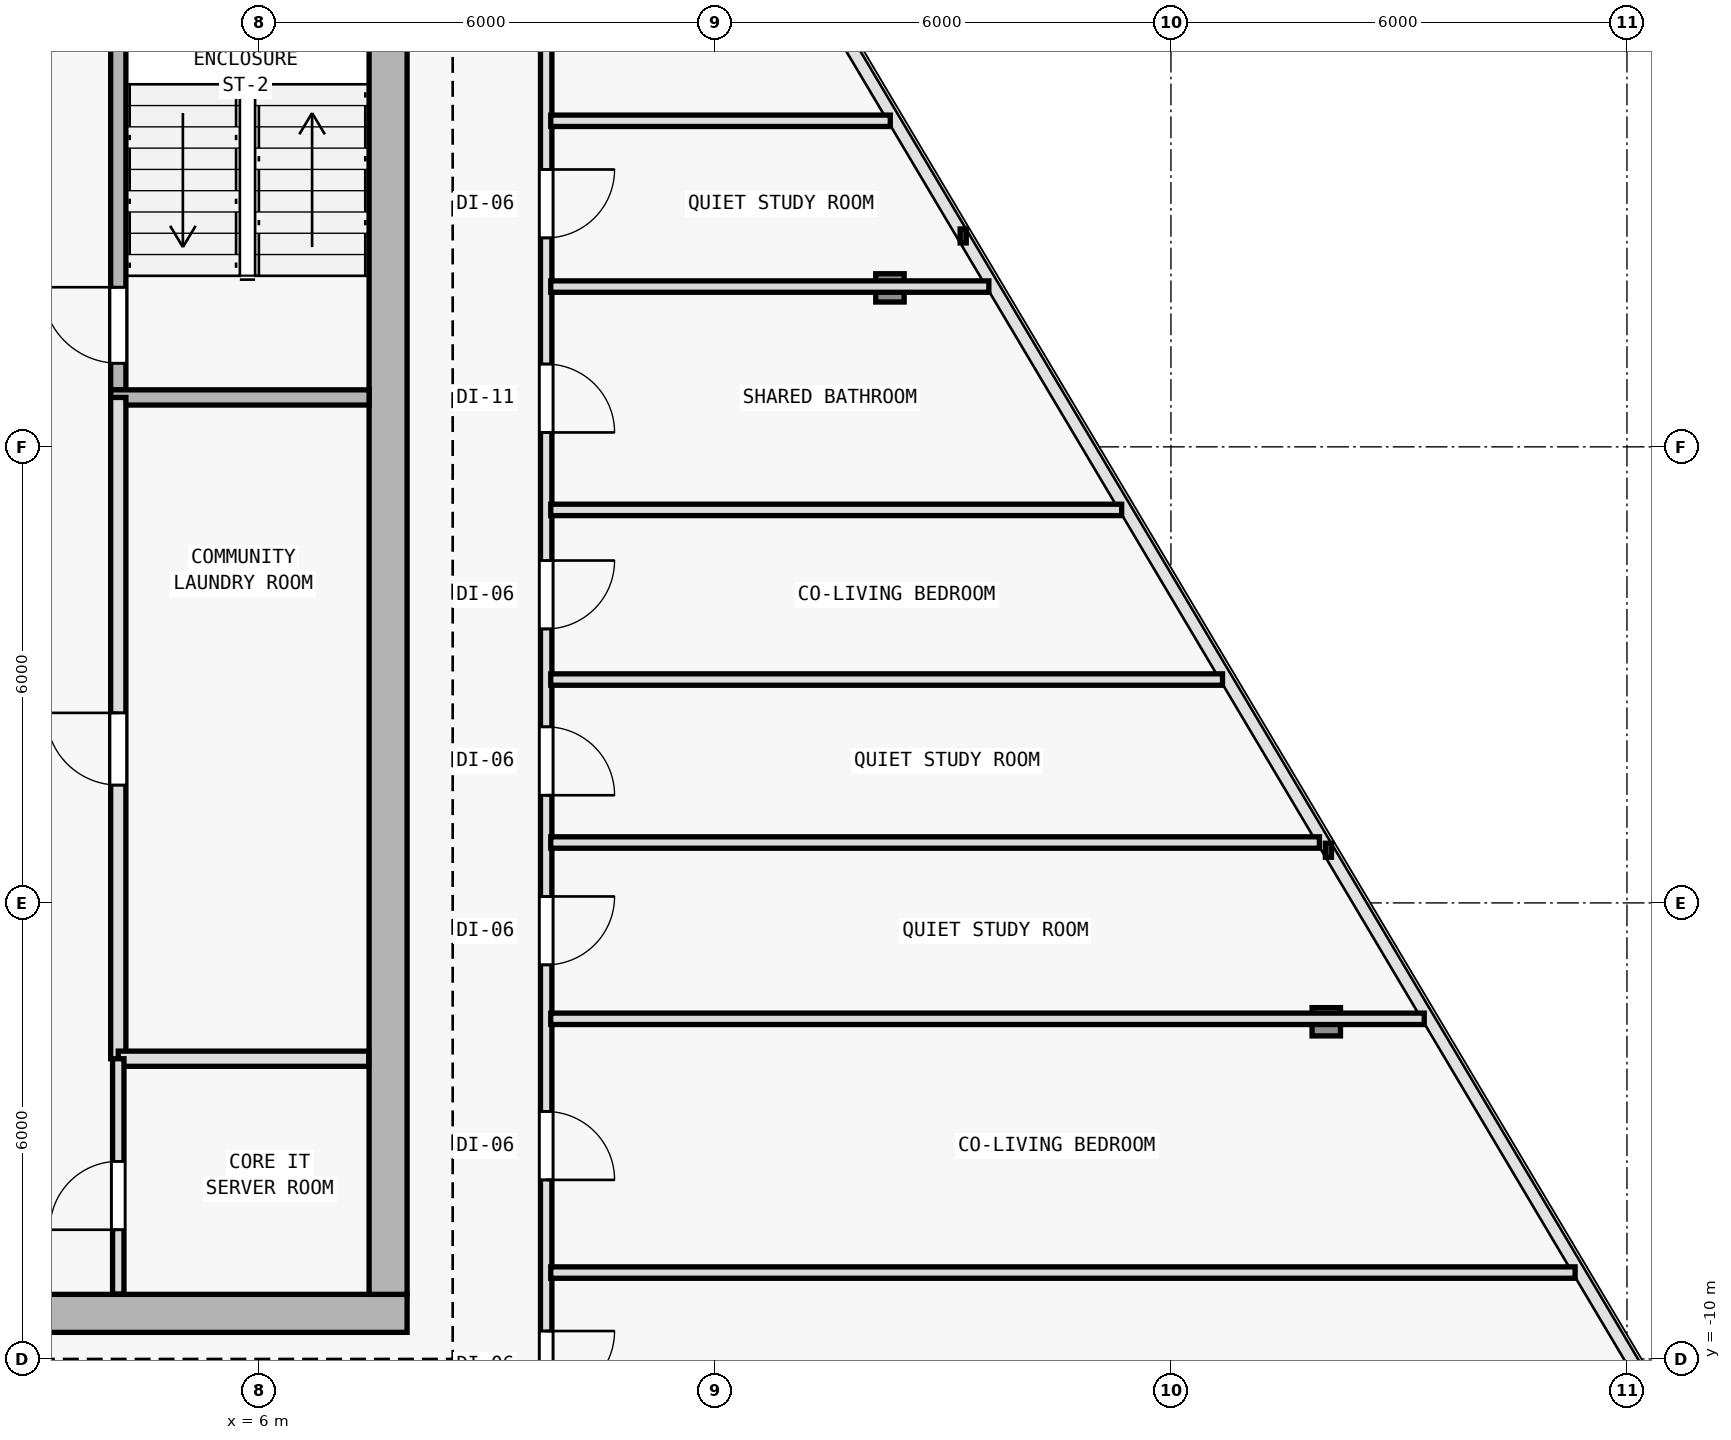
"""IFC4 building model, lengths in metres.
Left out: names, types, materials, properties, quantities, classifications, styles, units other than length and angle.
Written with IfcOpenShell. Run it as: python <this file> out.ifc"""

import sys

from ifc_helpers import new_model, si_unit, direction, frame, frame_2d, origin, origin_2d, place, context, subcontext, project, spatial, rectangle, i_section, extrude, element, fill, save


model = new_model("IFC4")
c1 = context("Model", 3, precision=1e-05, world=origin(), true_north=direction((0.0, 1.0)))
c2 = subcontext(c1, "Body", "Model", "MODEL_VIEW")
j1 = project(units=[si_unit("LENGTHUNIT", "METRE"), si_unit("PLANEANGLEUNIT", "RADIAN")], contexts=[c1])
p1 = place(None, origin())
s1 = spatial("IfcSite", under=j1, at=p1, CompositionType="ELEMENT")
p2 = place(p1, origin())
s2 = spatial("IfcBuilding", under=s1, at=p2, CompositionType="ELEMENT")
p3 = place(p2, frame((0.0, 0.0, 230.7)))
s3 = spatial("IfcBuildingStorey", under=s2, at=p3, CompositionType="ELEMENT", Elevation=230.7)
for number, where, z_axis, x_axis in (
    (1, (7.7, -9.4, 0.0), (0.0, 0.0, 1.0), (1.0, 0.0, 0.0)),
    (2, (7.7, 0.4, 0.0), (0.0, 0.0, 1.0), (1.0, 0.0, 0.0)),
):
    element("IfcColumn", number, at=place(p3, frame(where, z_axis=z_axis, x_axis=x_axis)), inside=s3, PredefinedType="COLUMN", context=c2, shape_type="SweptSolid", body=[
        extrude(i_section(OverallWidth=0.398, OverallDepth=0.387, WebThickness=0.013, FlangeThickness=0.022, FilletRadius=0.015, at=origin_2d()), origin(), (0.0, 0.0, 1.0), 3.6),
    ])
p4 = place(p3, frame((20.044, -5.564, 0.006), z_axis=(-0.026107436898, 0.021620221181, 0.999425318758), x_axis=(-0.637813971185, -0.770190455771, 0.0)))
e3 = element("IfcColumn", 3, at=p4, inside=s3, PredefinedType="COLUMN", context=c2, shape_type="SweptSolid", body=[
    extrude(i_section(OverallWidth=0.374, OverallDepth=0.372, WebThickness=0.012, FlangeThickness=0.02, FilletRadius=0.015, at=origin_2d()), origin(), (0.0, 0.0, 1.0), 3.591),
])
p5 = place(p3, frame((14.303, 4.092, 0.006), z_axis=(-0.018907326549, 0.00952167524, 0.999775900241), x_axis=(-0.449781931574, -0.893138406984, 0.0)))
e4 = element("IfcColumn", 4, at=p5, inside=s3, PredefinedType="COLUMN", context=c2, shape_type="SweptSolid", body=[
    extrude(i_section(OverallWidth=0.374, OverallDepth=0.372, WebThickness=0.012, FlangeThickness=0.02, FilletRadius=0.015, at=origin_2d()), origin(), (0.0, 0.0, 1.0), 3.59),
])
p6 = place(p3, frame((-7.95, -9.4, 0.0), z_axis=(0.0, 0.0, 1.0), x_axis=(1.0, 0.0, 0.0)))
e5 = element("IfcWall", 5, at=p6, inside=s3, PredefinedType="SHEAR", context=c2, shape_type="SweptSolid", body=[
    extrude(rectangle(XDim=15.9, YDim=0.5, at=frame_2d((7.95, 0.0))), origin(), (0.0, 0.0, 1.0), 3.35),
])
p7 = place(p6, frame((9.6, 0.0, 0.0)))
e6 = element("IfcOpeningElement", 6, at=p7, cuts=e5, PredefinedType="OPENING", context=c2, shape_type="SweptSolid", body=[
    extrude(rectangle(XDim=1.5, YDim=2.2, at=frame_2d((0.75, 1.1))), frame((0.0, 0.26, 0.0), z_axis=(0.0, -1.0, 0.0), x_axis=(1.0, 0.0, 0.0)), (0.0, 0.0, 1.0), 0.52),
])
p8 = place(p3, frame((7.7, 9.95, 0.0), z_axis=(0.0, 0.0, 1.0), x_axis=(0.0, -1.0, 0.0)))
e7 = element("IfcWall", 7, at=p8, inside=s3, PredefinedType="SHEAR", context=c2, shape_type="SweptSolid", body=[
    extrude(rectangle(XDim=19.1, YDim=0.5, at=frame_2d((9.55, 0.0))), origin(), (0.0, 0.0, 1.0), 3.35),
])
p9 = place(p3, frame((4.15, 2.75, 0.0), z_axis=(0.0, 0.0, 1.0), x_axis=(0.0, 1.0, 0.0)))
e8 = element("IfcWall", 8, at=p9, inside=s3, PredefinedType="SOLIDWALL", context=c2, shape_type="SweptSolid", body=[
    extrude(rectangle(XDim=7.2, YDim=0.2, at=frame_2d((3.6, 0.0))), origin(), (0.0, 0.0, 1.0), 3.35),
])
p10 = place(p9, frame((0.35, 0.0, 0.0)))
e9 = element("IfcOpeningElement", 9, at=p10, cuts=e8, PredefinedType="OPENING", context=c2, shape_type="SweptSolid", body=[
    extrude(rectangle(XDim=1.0, YDim=2.15, at=frame_2d((0.5, 1.075))), frame((0.0, 0.11, 0.0), z_axis=(0.0, -1.0, 0.0), x_axis=(1.0, 0.0, 0.0)), (0.0, 0.0, 1.0), 0.22),
])
p11 = place(p3, frame((4.05, 2.65, 0.0), z_axis=(0.0, 0.0, 1.0), x_axis=(1.0, 0.0, 0.0)))
e10 = element("IfcWall", 10, at=p11, inside=s3, PredefinedType="SOLIDWALL", context=c2, shape_type="SweptSolid", body=[
    extrude(rectangle(XDim=3.4, YDim=0.2, at=frame_2d((1.7, 0.0))), origin(), (0.0, 0.0, 1.0), 3.35),
])
p12 = place(p3, frame((4.15, -6.05, 0.0), z_axis=(0.0, 0.0, 1.0), x_axis=(0.0, 1.0, 0.0)))
e11 = element("IfcWall", 11, at=p12, inside=s3, PredefinedType="SOLIDWALL", context=c2, shape_type="SweptSolid", body=[
    extrude(rectangle(XDim=8.7, YDim=0.2, at=frame_2d((4.35, 0.0))), origin(), (0.0, 0.0, 1.0), 3.35),
])
p13 = place(p12, frame((3.6, 0.0, 0.0)))
e12 = element("IfcOpeningElement", 12, at=p13, cuts=e11, PredefinedType="OPENING", context=c2, shape_type="SweptSolid", body=[
    extrude(rectangle(XDim=0.95, YDim=2.1, at=frame_2d((0.475, 1.05))), frame((0.0, 0.11, 0.0), z_axis=(0.0, -1.0, 0.0), x_axis=(1.0, 0.0, 0.0)), (0.0, 0.0, 1.0), 0.22),
])
p14 = place(p3, frame((4.15, -6.05, 0.0), z_axis=(0.0, 0.0, 1.0), x_axis=(1.0, 0.0, 0.0)))
e13 = element("IfcWall", 13, at=p14, inside=s3, PredefinedType="SOLIDWALL", context=c2, shape_type="SweptSolid", body=[
    extrude(rectangle(XDim=3.295, YDim=0.2, at=frame_2d((1.647, 0.0))), origin(), (0.0, 0.0, 1.0), 3.35),
])
p15 = place(p3, frame((4.15, -9.145, 0.0), z_axis=(0.0, 0.0, 1.0), x_axis=(0.0, 1.0, 0.0)))
e14 = element("IfcWall", 14, at=p15, inside=s3, PredefinedType="PARTITIONING", context=c2, shape_type="SweptSolid", body=[
    extrude(rectangle(XDim=3.095, YDim=0.15, at=frame_2d((1.547, 0.0))), origin(), (0.0, 0.0, 1.0), 3.35),
])
p16 = place(p15, frame((0.845, 0.0, 0.0)))
e15 = element("IfcOpeningElement", 15, at=p16, cuts=e14, PredefinedType="OPENING", context=c2, shape_type="SweptSolid", body=[
    extrude(rectangle(XDim=0.9, YDim=2.1, at=frame_2d((0.45, 1.05))), frame((0.0, 0.085, 0.0), z_axis=(0.0, -1.0, 0.0), x_axis=(1.0, 0.0, 0.0)), (0.0, 0.0, 1.0), 0.17),
])
p17 = place(p3, frame((9.78, 8.226, 0.0), z_axis=(0.0, 0.0, 1.0), x_axis=(0.0, -1.0, 0.0)))
e16 = element("IfcWall", 16, at=p17, inside=s3, PredefinedType="PARTITIONING", context=c2, shape_type="SweptSolid", body=[
    extrude(rectangle(XDim=19.706, YDim=0.15, at=frame_2d((9.853, 0.0))), origin(), (0.0, 0.0, 1.0), 2.875),
])
p18 = place(p17, frame((17.858, 0.0, 0.0)))
e17 = element("IfcOpeningElement", 17, at=p18, cuts=e16, PredefinedType="OPENING", context=c2, shape_type="SweptSolid", body=[
    extrude(rectangle(XDim=0.9, YDim=2.1, at=frame_2d((0.45, 1.05))), frame((0.0, 0.085, 0.0), z_axis=(0.0, -1.0, 0.0), x_axis=(1.0, 0.0, 0.0)), (0.0, 0.0, 1.0), 0.17),
])
p19 = place(p17, frame((14.97, 0.0, 0.0)))
e18 = element("IfcOpeningElement", 18, at=p19, cuts=e16, PredefinedType="OPENING", context=c2, shape_type="SweptSolid", body=[
    extrude(rectangle(XDim=0.9, YDim=2.1, at=frame_2d((0.45, 1.05))), frame((0.0, 0.085, 0.0), z_axis=(0.0, -1.0, 0.0), x_axis=(1.0, 0.0, 0.0)), (0.0, 0.0, 1.0), 0.17),
])
p20 = place(p17, frame((12.141, 0.0, 0.0)))
e19 = element("IfcOpeningElement", 19, at=p20, cuts=e16, PredefinedType="OPENING", context=c2, shape_type="SweptSolid", body=[
    extrude(rectangle(XDim=0.9, YDim=2.1, at=frame_2d((0.45, 1.05))), frame((0.0, 0.085, 0.0), z_axis=(0.0, -1.0, 0.0), x_axis=(1.0, 0.0, 0.0)), (0.0, 0.0, 1.0), 0.17),
])
p21 = place(p17, frame((9.909, 0.0, 0.0)))
e20 = element("IfcOpeningElement", 20, at=p21, cuts=e16, PredefinedType="OPENING", context=c2, shape_type="SweptSolid", body=[
    extrude(rectangle(XDim=0.9, YDim=2.1, at=frame_2d((0.45, 1.05))), frame((0.0, 0.085, 0.0), z_axis=(0.0, -1.0, 0.0), x_axis=(1.0, 0.0, 0.0)), (0.0, 0.0, 1.0), 0.17),
])
p22 = place(p17, frame((7.721, 0.0, 0.0)))
e21 = element("IfcOpeningElement", 21, at=p22, cuts=e16, PredefinedType="OPENING", context=c2, shape_type="SweptSolid", body=[
    extrude(rectangle(XDim=0.9, YDim=2.1, at=frame_2d((0.45, 1.05))), frame((0.0, 0.085, 0.0), z_axis=(0.0, -1.0, 0.0), x_axis=(1.0, 0.0, 0.0)), (0.0, 0.0, 1.0), 0.17),
])
p23 = place(p17, frame((5.136, 0.0, 0.0)))
e22 = element("IfcOpeningElement", 22, at=p23, cuts=e16, PredefinedType="OPENING", context=c2, shape_type="SweptSolid", body=[
    extrude(rectangle(XDim=0.9, YDim=2.1, at=frame_2d((0.45, 1.05))), frame((0.0, 0.085, 0.0), z_axis=(0.0, -1.0, 0.0), x_axis=(1.0, 0.0, 0.0)), (0.0, 0.0, 1.0), 0.17),
])
p24 = place(p17, frame((2.577, 0.0, 0.0)))
e23 = element("IfcOpeningElement", 23, at=p24, cuts=e16, PredefinedType="OPENING", context=c2, shape_type="SweptSolid", body=[
    extrude(rectangle(XDim=0.9, YDim=2.1, at=frame_2d((0.45, 1.05))), frame((0.0, 0.085, 0.0), z_axis=(0.0, -1.0, 0.0), x_axis=(1.0, 0.0, 0.0)), (0.0, 0.0, 1.0), 0.17),
])
p25 = place(p3, frame((9.84, -5.525, 0.0), z_axis=(0.0, 0.0, 1.0), x_axis=(1.0, 0.0, 0.0)))
e24 = element("IfcWall", 24, at=p25, inside=s3, PredefinedType="PARTITIONING", context=c2, shape_type="SweptSolid", body=[
    extrude(rectangle(XDim=11.492, YDim=0.15, at=frame_2d((5.746, 0.0))), origin(), (0.0, 0.0, 1.0), 2.875),
])
p26 = place(p3, frame((9.84, 4.109, 0.0), z_axis=(0.0, 0.0, 1.0), x_axis=(1.0, 0.0, 0.0)))
e25 = element("IfcWall", 25, at=p26, inside=s3, PredefinedType="PARTITIONING", context=c2, shape_type="SweptSolid", body=[
    extrude(rectangle(XDim=5.764, YDim=0.15, at=frame_2d((2.882, 0.0))), origin(), (0.0, 0.0, 1.0), 2.965),
])
p27 = place(p3, frame((9.84, -1.061, 0.0), z_axis=(0.0, 0.0, 1.0), x_axis=(1.0, 0.0, 0.0)))
e26 = element("IfcWall", 26, at=p27, inside=s3, PredefinedType="PARTITIONING", context=c2, shape_type="SweptSolid", body=[
    extrude(rectangle(XDim=8.838, YDim=0.15, at=frame_2d((4.419, 0.0))), origin(), (0.0, 0.0, 1.0), 2.925),
])
p28 = place(p3, frame((9.84, -8.863, 0.0), z_axis=(0.0, 0.0, 1.0), x_axis=(1.0, 0.0, 0.0)))
e27 = element("IfcWall", 27, at=p28, inside=s3, PredefinedType="PARTITIONING", context=c2, shape_type="SweptSolid", body=[
    extrude(rectangle(XDim=13.478, YDim=0.15, at=frame_2d((6.739, 0.0))), origin(), (0.0, 0.0, 1.0), 2.875),
])
p29 = place(p3, frame((9.84, -3.205, 0.0), z_axis=(0.0, 0.0, 1.0), x_axis=(1.0, 0.0, 0.0)))
e28 = element("IfcWall", 28, at=p29, inside=s3, PredefinedType="PARTITIONING", context=c2, shape_type="SweptSolid", body=[
    extrude(rectangle(XDim=10.113, YDim=0.15, at=frame_2d((5.057, 0.0))), origin(), (0.0, 0.0, 1.0), 2.925),
])
p30 = place(p3, frame((9.84, 1.17, 0.0), z_axis=(0.0, 0.0, 1.0), x_axis=(1.0, 0.0, 0.0)))
e29 = element("IfcWall", 29, at=p30, inside=s3, PredefinedType="PARTITIONING", context=c2, shape_type="SweptSolid", body=[
    extrude(rectangle(XDim=7.511, YDim=0.15, at=frame_2d((3.756, 0.0))), origin(), (0.0, 0.0, 1.0), 2.925),
])
p31 = place(p3, frame((9.84, 6.29, 0.0), z_axis=(0.0, 0.0, 1.0), x_axis=(1.0, 0.0, 0.0)))
e30 = element("IfcWall", 30, at=p31, inside=s3, PredefinedType="PARTITIONING", context=c2, shape_type="SweptSolid", body=[
    extrude(rectangle(XDim=4.467, YDim=0.15, at=frame_2d((2.234, 0.0))), origin(), (0.0, 0.0, 1.0), 2.965),
])
p32 = place(p10, origin())
e31 = element("IfcDoor", 31, at=p32, inside=s3, OperationType="SINGLE_SWING_RIGHT", PredefinedType="DOOR", context=c2, shape_type="SweptSolid", body=[
    extrude(rectangle(XDim=1.0, YDim=2.15, at=frame_2d((0.5, 1.075))), frame((0.0, 0.025, 0.0), z_axis=(0.0, -1.0, 0.0), x_axis=(1.0, 0.0, 0.0)), (0.0, 0.0, 1.0), 0.05),
])
fill(e9, e31)
p33 = place(p13, origin())
e32 = element("IfcDoor", 32, at=p33, inside=s3, OperationType="SINGLE_SWING_RIGHT", PredefinedType="DOOR", context=c2, shape_type="SweptSolid", body=[
    extrude(rectangle(XDim=0.95, YDim=2.1, at=frame_2d((0.475, 1.05))), frame((0.0, 0.025, 0.0), z_axis=(0.0, -1.0, 0.0), x_axis=(1.0, 0.0, 0.0)), (0.0, 0.0, 1.0), 0.05),
])
fill(e12, e32)
p34 = place(p16, origin())
e33 = element("IfcDoor", 33, at=p34, inside=s3, OperationType="SINGLE_SWING_LEFT", PredefinedType="DOOR", context=c2, shape_type="SweptSolid", body=[
    extrude(rectangle(XDim=0.9, YDim=2.1, at=frame_2d((0.45, 1.05))), frame((0.0, 0.025, 0.0), z_axis=(0.0, -1.0, 0.0), x_axis=(1.0, 0.0, 0.0)), (0.0, 0.0, 1.0), 0.05),
])
fill(e15, e33)
p35 = place(p18, origin())
e34 = element("IfcDoor", 34, at=p35, inside=s3, OperationType="SINGLE_SWING_LEFT", PredefinedType="DOOR", context=c2, shape_type="SweptSolid", body=[
    extrude(rectangle(XDim=0.9, YDim=2.1, at=frame_2d((0.45, 1.05))), frame((0.0, 0.025, 0.0), z_axis=(0.0, -1.0, 0.0), x_axis=(1.0, 0.0, 0.0)), (0.0, 0.0, 1.0), 0.05),
])
fill(e17, e34)
p36 = place(p19, origin())
e35 = element("IfcDoor", 35, at=p36, inside=s3, OperationType="SINGLE_SWING_RIGHT", PredefinedType="DOOR", context=c2, shape_type="SweptSolid", body=[
    extrude(rectangle(XDim=0.9, YDim=2.1, at=frame_2d((0.45, 1.05))), frame((0.0, 0.025, 0.0), z_axis=(0.0, -1.0, 0.0), x_axis=(1.0, 0.0, 0.0)), (0.0, 0.0, 1.0), 0.05),
])
fill(e18, e35)
p37 = place(p20, origin())
e36 = element("IfcDoor", 36, at=p37, inside=s3, OperationType="SINGLE_SWING_LEFT", PredefinedType="DOOR", context=c2, shape_type="SweptSolid", body=[
    extrude(rectangle(XDim=0.9, YDim=2.1, at=frame_2d((0.45, 1.05))), frame((0.0, 0.025, 0.0), z_axis=(0.0, -1.0, 0.0), x_axis=(1.0, 0.0, 0.0)), (0.0, 0.0, 1.0), 0.05),
])
fill(e19, e36)
p38 = place(p21, origin())
e37 = element("IfcDoor", 37, at=p38, inside=s3, OperationType="SINGLE_SWING_RIGHT", PredefinedType="DOOR", context=c2, shape_type="SweptSolid", body=[
    extrude(rectangle(XDim=0.9, YDim=2.1, at=frame_2d((0.45, 1.05))), frame((0.0, 0.025, 0.0), z_axis=(0.0, -1.0, 0.0), x_axis=(1.0, 0.0, 0.0)), (0.0, 0.0, 1.0), 0.05),
])
fill(e20, e37)
p39 = place(p22, origin())
e38 = element("IfcDoor", 38, at=p39, inside=s3, OperationType="SINGLE_SWING_LEFT", PredefinedType="DOOR", context=c2, shape_type="SweptSolid", body=[
    extrude(rectangle(XDim=0.9, YDim=2.1, at=frame_2d((0.45, 1.05))), frame((0.0, 0.025, 0.0), z_axis=(0.0, -1.0, 0.0), x_axis=(1.0, 0.0, 0.0)), (0.0, 0.0, 1.0), 0.05),
])
fill(e21, e38)
p40 = place(p23, origin())
e39 = element("IfcDoor", 39, at=p40, inside=s3, OperationType="SINGLE_SWING_RIGHT", PredefinedType="DOOR", context=c2, shape_type="SweptSolid", body=[
    extrude(rectangle(XDim=0.9, YDim=2.1, at=frame_2d((0.45, 1.05))), frame((0.0, 0.025, 0.0), z_axis=(0.0, -1.0, 0.0), x_axis=(1.0, 0.0, 0.0)), (0.0, 0.0, 1.0), 0.05),
])
fill(e22, e39)
p41 = place(p24, origin())
e40 = element("IfcDoor", 40, at=p41, inside=s3, OperationType="SINGLE_SWING_LEFT", PredefinedType="DOOR", context=c2, shape_type="SweptSolid", body=[
    extrude(rectangle(XDim=0.9, YDim=2.1, at=frame_2d((0.45, 1.05))), frame((0.0, 0.025, 0.0), z_axis=(0.0, -1.0, 0.0), x_axis=(1.0, 0.0, 0.0)), (0.0, 0.0, 1.0), 0.05),
])
fill(e23, e40)
save(model, sys.argv[1])
